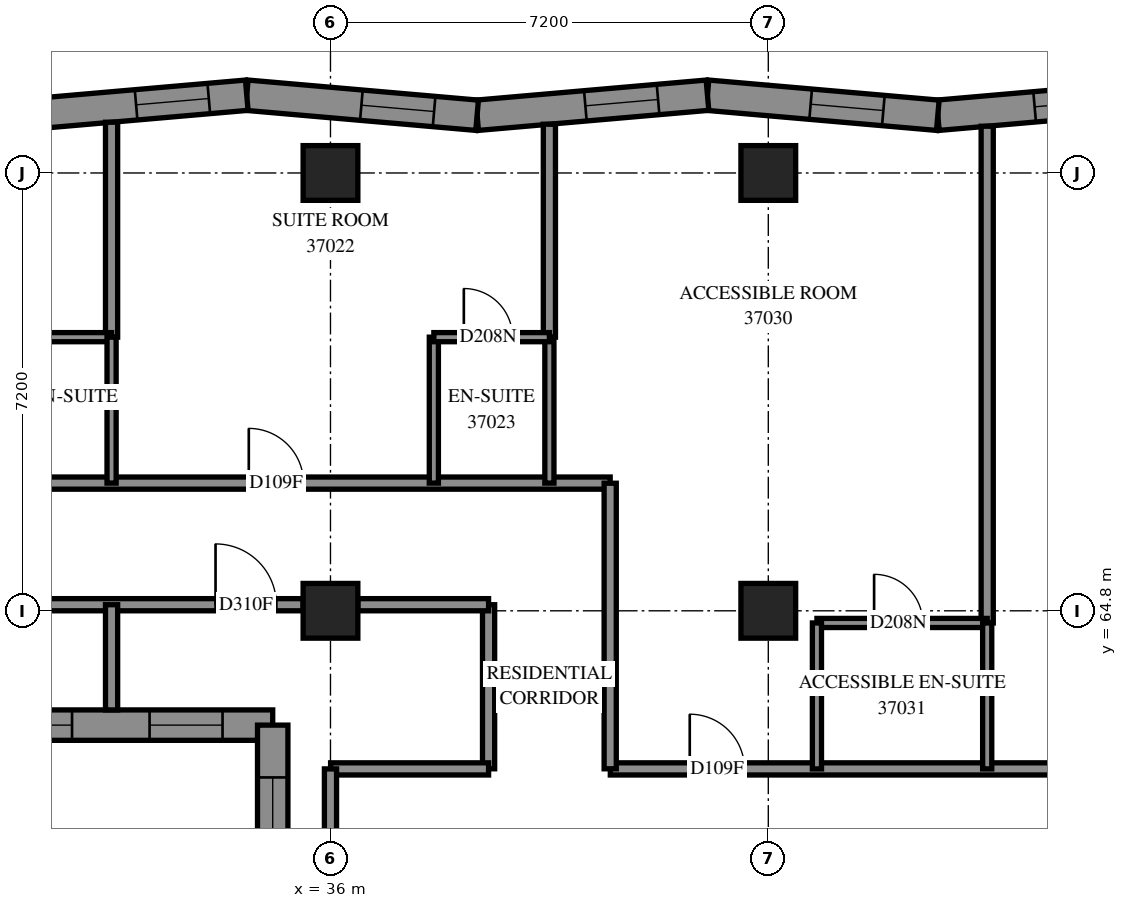
"""IFC4 building model, lengths in metres.
Left out: names, types, materials, properties, quantities, classifications, styles, units other than length and angle.
Written with IfcOpenShell. Run it as: python <this file> out.ifc"""

import sys

from ifc_helpers import new_model, si_unit, direction, frame, frame_2d, origin, origin_2d, place, context, subcontext, project, spatial, polyline, rectangle, outline, extrude, element, fill, save


model = new_model("IFC4")
c1 = context("Model", 3, precision=1e-05, world=origin(), true_north=direction((0.0, 1.0)))
c2 = subcontext(c1, "Body", "Model", "MODEL_VIEW")
j1 = project(units=[si_unit("LENGTHUNIT", "METRE"), si_unit("PLANEANGLEUNIT", "RADIAN")], contexts=[c1])
p1 = place(None, origin())
s1 = spatial("IfcSite", under=j1, at=p1, CompositionType="ELEMENT")
p2 = place(p1, origin())
s2 = spatial("IfcBuilding", under=s1, at=p2, CompositionType="ELEMENT")
p3 = place(p2, frame((0.0, 0.0, 138.8)))
s3 = spatial("IfcBuildingStorey", under=s2, at=p3, CompositionType="ELEMENT", Elevation=138.8)
for number, where, z_axis, x_axis in (
    (1, (36.0, 64.8, 0.0), (0.0, 0.0, 1.0), (1.0, 0.0, 0.0)),
    (2, (36.0, 72.0, 0.0), (0.0, 0.0, 1.0), (1.0, 0.0, 0.0)),
    (3, (43.2, 64.8, 0.0), (0.0, 0.0, 1.0), (1.0, 0.0, 0.0)),
    (4, (43.2, 72.0, 0.0), (0.0, 0.0, 1.0), (1.0, 0.0, 0.0)),
):
    element("IfcColumn", number, at=place(p3, frame(where, z_axis=z_axis, x_axis=x_axis)), inside=s3, PredefinedType="COLUMN", context=c2, shape_type="SweptSolid", body=[
        extrude(rectangle(XDim=0.9, YDim=0.9, at=origin_2d()), origin(), (0.0, 0.0, 1.0), 3.1),
    ])
p4 = place(p3, frame((49.776, 73.279, 0.0), z_axis=(0.0, 0.0, 1.0), x_axis=(-0.9962273538, -0.0867816769, 0.0)))
e5 = element("IfcWall", 5, at=p4, inside=s3, PredefinedType="SOLIDWALL", context=c2, shape_type="SweptSolid", body=[
    extrude(outline(polyline([(-0.022, -0.25), (3.781, -0.25), (3.824, 0.25), (0.022, 0.25), (-0.022, -0.25)])), origin(), (0.0, 0.0, 1.0), 3.1),
])
p5 = place(p4, frame((1.005, 0.0, 0.45)))
e6 = element("IfcOpeningElement", 6, at=p5, cuts=e5, PredefinedType="OPENING", context=c2, shape_type="SweptSolid", body=[
    extrude(rectangle(XDim=1.2, YDim=2.5, at=frame_2d((0.6, 1.25))), frame((0.0, 0.26, 0.0), z_axis=(0.0, -1.0, 0.0), x_axis=(1.0, 0.0, 0.0)), (0.0, 0.0, 1.0), 0.52),
])
p6 = place(p3, frame((45.988, 72.949, 0.0), z_axis=(0.0, 0.0, 1.0), x_axis=(-0.9962273538, 0.0867816769, 0.0)))
e7 = element("IfcWall", 7, at=p6, inside=s3, PredefinedType="SOLIDWALL", context=c2, shape_type="SweptSolid", body=[
    extrude(outline(polyline([(0.022, -0.25), (3.824, -0.25), (3.781, 0.25), (-0.022, 0.25), (0.022, -0.25)])), origin(), (0.0, 0.0, 1.0), 3.1),
])
p7 = place(p6, frame((0.899, 0.0, 0.45)))
e8 = element("IfcOpeningElement", 8, at=p7, cuts=e7, PredefinedType="OPENING", context=c2, shape_type="SweptSolid", body=[
    extrude(rectangle(XDim=1.2, YDim=2.5, at=frame_2d((0.6, 1.25))), frame((0.0, 0.26, 0.0), z_axis=(0.0, -1.0, 0.0), x_axis=(1.0, 0.0, 0.0)), (0.0, 0.0, 1.0), 0.52),
])
p8 = place(p3, frame((42.2, 73.279, 0.0), z_axis=(0.0, 0.0, 1.0), x_axis=(-0.9962273538, -0.0867816769, 0.0)))
e9 = element("IfcWall", 9, at=p8, inside=s3, PredefinedType="SOLIDWALL", context=c2, shape_type="SweptSolid", body=[
    extrude(outline(polyline([(-0.022, -0.25), (3.781, -0.25), (3.824, 0.25), (0.022, 0.25), (-0.022, -0.25)])), origin(), (0.0, 0.0, 1.0), 3.1),
])
p9 = place(p8, frame((0.816, 0.0, 0.45)))
e10 = element("IfcOpeningElement", 10, at=p9, cuts=e9, PredefinedType="OPENING", context=c2, shape_type="SweptSolid", body=[
    extrude(rectangle(XDim=1.2, YDim=2.5, at=frame_2d((0.6, 1.25))), frame((0.0, 0.26, 0.0), z_axis=(0.0, -1.0, 0.0), x_axis=(1.0, 0.0, 0.0)), (0.0, 0.0, 1.0), 0.52),
])
p10 = place(p3, frame((38.411, 72.949, 0.0), z_axis=(0.0, 0.0, 1.0), x_axis=(-0.9962271558, 0.0867839505, 0.0)))
e11 = element("IfcWall", 11, at=p10, inside=s3, PredefinedType="SOLIDWALL", context=c2, shape_type="SweptSolid", body=[
    extrude(outline(polyline([(0.022, -0.25), (3.824, -0.25), (3.781, 0.25), (-0.022, 0.25), (0.022, -0.25)])), origin(), (0.0, 0.0, 1.0), 3.1),
])
p11 = place(p10, frame((0.71, 0.0, 0.45)))
e12 = element("IfcOpeningElement", 12, at=p11, cuts=e11, PredefinedType="OPENING", context=c2, shape_type="SweptSolid", body=[
    extrude(rectangle(XDim=1.2, YDim=2.5, at=frame_2d((0.6, 1.25))), frame((0.0, 0.26, 0.0), z_axis=(0.0, -1.0, 0.0), x_axis=(1.0, 0.0, 0.0)), (0.0, 0.0, 1.0), 0.52),
])
p12 = place(p3, frame((34.623, 73.279, 0.0), z_axis=(0.0, 0.0, 1.0), x_axis=(-0.9962273538, -0.0867816769, 0.0)))
e13 = element("IfcWall", 13, at=p12, inside=s3, PredefinedType="SOLIDWALL", context=c2, shape_type="SweptSolid", body=[
    extrude(outline(polyline([(-0.022, -0.25), (3.781, -0.25), (3.824, 0.25), (0.022, 0.25), (-0.022, -0.25)])), origin(), (0.0, 0.0, 1.0), 3.1),
])
p13 = place(p12, frame((0.627, 0.0, 0.45)))
e14 = element("IfcOpeningElement", 14, at=p13, cuts=e13, PredefinedType="OPENING", context=c2, shape_type="SweptSolid", body=[
    extrude(rectangle(XDim=1.2, YDim=2.5, at=frame_2d((0.6, 1.25))), frame((0.0, 0.26, 0.0), z_axis=(0.0, -1.0, 0.0), x_axis=(1.0, 0.0, 0.0)), (0.0, 0.0, 1.0), 0.52),
])
p14 = place(p3, frame((19.72, 62.92, 0.0), z_axis=(0.0, 0.0, 1.0), x_axis=(1.0, 0.0, 0.0)))
e15 = element("IfcWall", 15, at=p14, inside=s3, PredefinedType="SOLIDWALL", context=c2, shape_type="SweptSolid", body=[
    extrude(outline(polyline([(-0.25, -0.25), (15.08, -0.25), (15.58, 0.25), (0.25, 0.25), (-0.25, -0.25)])), origin(), (0.0, 0.0, 1.0), 3.1),
])
p15 = place(p14, frame((2.28, 0.0, 0.45)))
e16 = element("IfcOpeningElement", 16, at=p15, cuts=e15, PredefinedType="OPENING", context=c2, shape_type="SweptSolid", body=[
    extrude(rectangle(XDim=2.8, YDim=2.5, at=frame_2d((1.4, 1.25))), frame((0.0, 0.26, 0.0), z_axis=(0.0, -1.0, 0.0), x_axis=(1.0, 0.0, 0.0)), (0.0, 0.0, 1.0), 0.52),
])
p16 = place(p14, frame((5.88, 0.0, 0.45)))
e17 = element("IfcOpeningElement", 17, at=p16, cuts=e15, PredefinedType="OPENING", context=c2, shape_type="SweptSolid", body=[
    extrude(rectangle(XDim=2.8, YDim=2.5, at=frame_2d((1.4, 1.25))), frame((0.0, 0.26, 0.0), z_axis=(0.0, -1.0, 0.0), x_axis=(1.0, 0.0, 0.0)), (0.0, 0.0, 1.0), 0.52),
])
p17 = place(p14, frame((9.23, 0.0, 0.45)))
e18 = element("IfcOpeningElement", 18, at=p17, cuts=e15, PredefinedType="OPENING", context=c2, shape_type="SweptSolid", body=[
    extrude(rectangle(XDim=2.8, YDim=2.5, at=frame_2d((1.4, 1.25))), frame((0.0, 0.26, 0.0), z_axis=(0.0, -1.0, 0.0), x_axis=(1.0, 0.0, 0.0)), (0.0, 0.0, 1.0), 0.52),
])
p18 = place(p14, frame((0.565, 0.0, 0.45)))
e19 = element("IfcOpeningElement", 19, at=p18, cuts=e15, PredefinedType="OPENING", context=c2, shape_type="SweptSolid", body=[
    extrude(rectangle(XDim=1.2, YDim=2.5, at=frame_2d((0.6, 1.25))), frame((0.0, 0.26, 0.0), z_axis=(0.0, -1.0, 0.0), x_axis=(1.0, 0.0, 0.0)), (0.0, 0.0, 1.0), 0.52),
])
p19 = place(p14, frame((13.305, 0.0, 0.45)))
e20 = element("IfcOpeningElement", 20, at=p19, cuts=e15, PredefinedType="OPENING", context=c2, shape_type="SweptSolid", body=[
    extrude(rectangle(XDim=1.2, YDim=2.5, at=frame_2d((0.6, 1.25))), frame((0.0, 0.26, 0.0), z_axis=(0.0, -1.0, 0.0), x_axis=(1.0, 0.0, 0.0)), (0.0, 0.0, 1.0), 0.52),
])
p20 = place(p3, frame((35.05, 62.92, 0.0), z_axis=(0.0, 0.0, 1.0), x_axis=(0.0, -1.0, 0.0)))
e21 = element("IfcWall", 21, at=p20, inside=s3, PredefinedType="SOLIDWALL", context=c2, shape_type="SweptSolid", body=[
    extrude(outline(polyline([(0.25, -0.25), (6.52, -0.25), (6.02, 0.25), (-0.25, 0.25), (0.25, -0.25)])), origin(), (0.0, 0.0, 1.0), 3.1),
])
p21 = place(p20, frame((0.86, 0.0, 0.45)))
e22 = element("IfcOpeningElement", 22, at=p21, cuts=e21, PredefinedType="OPENING", context=c2, shape_type="SweptSolid", body=[
    extrude(rectangle(XDim=1.2, YDim=2.5, at=frame_2d((0.6, 1.25))), frame((0.0, 0.26, 0.0), z_axis=(0.0, -1.0, 0.0), x_axis=(1.0, 0.0, 0.0)), (0.0, 0.0, 1.0), 0.52),
])
p22 = place(p20, frame((2.97, 0.0, 0.7)))
e23 = element("IfcOpeningElement", 23, at=p22, cuts=e21, PredefinedType="OPENING", context=c2, shape_type="SweptSolid", body=[
    extrude(rectangle(XDim=1.8, YDim=2.2, at=frame_2d((0.9, 1.1))), frame((0.0, 0.26, 0.0), z_axis=(0.0, -1.0, 0.0), x_axis=(1.0, 0.0, 0.0)), (0.0, 0.0, 1.0), 0.52),
])
p23 = place(p3, frame((21.6, 66.9, 0.0), z_axis=(0.0, 0.0, 1.0), x_axis=(1.0, 0.0, 0.0)))
e24 = element("IfcWall", 24, at=p23, inside=s3, PredefinedType="PARTITIONING", context=c2, shape_type="SweptSolid", body=[
    extrude(rectangle(XDim=19.0, YDim=0.2, at=frame_2d((9.5, 0.0))), origin(), (0.0, 0.0, 1.0), 3.1),
])
p24 = place(p23, frame((2.3, 0.0, 0.0)))
e25 = element("IfcOpeningElement", 25, at=p24, cuts=e24, PredefinedType="OPENING", context=c2, shape_type="SweptSolid", body=[
    extrude(rectangle(XDim=0.9, YDim=2.1, at=frame_2d((0.45, 1.05))), frame((0.0, 0.11, 0.0), z_axis=(0.0, -1.0, 0.0), x_axis=(1.0, 0.0, 0.0)), (0.0, 0.0, 1.0), 0.22),
])
p25 = place(p23, frame((5.957, 0.0, 0.0)))
e26 = element("IfcOpeningElement", 26, at=p25, cuts=e24, PredefinedType="OPENING", context=c2, shape_type="SweptSolid", body=[
    extrude(rectangle(XDim=0.9, YDim=2.1, at=frame_2d((0.45, 1.05))), frame((0.0, 0.11, 0.0), z_axis=(0.0, -1.0, 0.0), x_axis=(1.0, 0.0, 0.0)), (0.0, 0.0, 1.0), 0.22),
])
p26 = place(p23, frame((13.057, 0.0, 0.0)))
e27 = element("IfcOpeningElement", 27, at=p26, cuts=e24, PredefinedType="OPENING", context=c2, shape_type="SweptSolid", body=[
    extrude(rectangle(XDim=0.9, YDim=2.1, at=frame_2d((0.45, 1.05))), frame((0.0, 0.11, 0.0), z_axis=(0.0, -1.0, 0.0), x_axis=(1.0, 0.0, 0.0)), (0.0, 0.0, 1.0), 0.22),
])
p27 = place(p3, frame((40.602, 62.2, 0.0), z_axis=(0.0, 0.0, 1.0), x_axis=(1.0, 0.0, 0.0)))
e28 = element("IfcWall", 28, at=p27, inside=s3, PredefinedType="PARTITIONING", context=c2, shape_type="SweptSolid", body=[
    extrude(rectangle(XDim=14.298, YDim=0.2, at=frame_2d((7.149, 0.0))), origin(), (0.0, 0.0, 1.0), 3.1),
])
p28 = place(p27, frame((1.306, 0.0, 0.0)))
e29 = element("IfcOpeningElement", 29, at=p28, cuts=e28, PredefinedType="OPENING", context=c2, shape_type="SweptSolid", body=[
    extrude(rectangle(XDim=0.9, YDim=2.1, at=frame_2d((0.45, 1.05))), frame((0.0, 0.11, 0.0), z_axis=(0.0, -1.0, 0.0), x_axis=(1.0, 0.0, 0.0)), (0.0, 0.0, 1.0), 0.22),
])
p29 = place(p27, frame((8.455, 0.0, 0.0)))
e30 = element("IfcOpeningElement", 30, at=p29, cuts=e28, PredefinedType="OPENING", context=c2, shape_type="SweptSolid", body=[
    extrude(rectangle(XDim=0.9, YDim=2.1, at=frame_2d((0.45, 1.05))), frame((0.0, 0.11, 0.0), z_axis=(0.0, -1.0, 0.0), x_axis=(1.0, 0.0, 0.0)), (0.0, 0.0, 1.0), 0.22),
])
p30 = place(p3, frame((46.8, 64.6, 0.0), z_axis=(0.0, 0.0, 1.0), x_axis=(0.0, 1.0, 0.0)))
e31 = element("IfcWall", 31, at=p30, inside=s3, PredefinedType="PARTITIONING", context=c2, shape_type="SweptSolid", body=[
    extrude(rectangle(XDim=8.169, YDim=0.2, at=frame_2d((4.085, 0.0))), origin(), (0.0, 0.0, 1.0), 3.1),
])
p31 = place(p3, frame((29.25, 64.9, 0.0), z_axis=(0.0, 0.0, 1.0), x_axis=(1.0, 0.0, 0.0)))
e32 = element("IfcWall", 32, at=p31, inside=s3, PredefinedType="PARTITIONING", context=c2, shape_type="SweptSolid", body=[
    extrude(rectangle(XDim=6.3, YDim=0.2, at=frame_2d((3.15, 0.0))), origin(), (0.0, 0.0, 1.0), 2.6),
])
p32 = place(p31, frame((4.86, 0.0, 0.0)))
e33 = element("IfcOpeningElement", 33, at=p32, cuts=e32, PredefinedType="OPENING", context=c2, shape_type="SweptSolid", body=[
    extrude(rectangle(XDim=1.0, YDim=2.1, at=frame_2d((0.5, 1.05))), frame((0.0, 0.11, 0.0), z_axis=(0.0, -1.0, 0.0), x_axis=(1.0, 0.0, 0.0)), (0.0, 0.0, 1.0), 0.22),
])
p33 = place(p3, frame((40.6, 62.202, 0.0), z_axis=(0.0, 0.0, 1.0), x_axis=(0.0, 1.0, 0.0)))
e34 = element("IfcWall", 34, at=p33, inside=s3, PredefinedType="PARTITIONING", context=c2, shape_type="SweptSolid", body=[
    extrude(rectangle(XDim=4.696, YDim=0.2, at=frame_2d((2.348, 0.0))), origin(), (0.0, 0.0, 1.0), 3.1),
])
p34 = place(p3, frame((32.4, 69.3, 0.0), z_axis=(0.0, 0.0, 1.0), x_axis=(0.0, 1.0, 0.0)))
e35 = element("IfcWall", 35, at=p34, inside=s3, PredefinedType="PARTITIONING", context=c2, shape_type="SweptSolid", body=[
    extrude(rectangle(XDim=3.534, YDim=0.2, at=frame_2d((1.767, 0.0))), origin(), (0.0, 0.0, 1.0), 3.1),
])
p35 = place(p3, frame((39.6, 69.3, 0.0), z_axis=(0.0, 0.0, 1.0), x_axis=(0.0, 1.0, 0.0)))
e36 = element("IfcWall", 36, at=p35, inside=s3, PredefinedType="PARTITIONING", context=c2, shape_type="SweptSolid", body=[
    extrude(rectangle(XDim=3.502, YDim=0.2, at=frame_2d((1.751, 0.0))), origin(), (0.0, 0.0, 1.0), 3.1),
])
p36 = place(p3, frame((29.2, 69.3, 0.0), z_axis=(0.0, 0.0, 1.0), x_axis=(1.0, 0.0, 0.0)))
e37 = element("IfcWall", 37, at=p36, inside=s3, PredefinedType="PARTITIONING", context=c2, shape_type="SweptSolid", body=[
    extrude(rectangle(XDim=3.2, YDim=0.15, at=frame_2d((1.6, 0.0))), origin(), (0.0, 0.0, 1.0), 3.1),
])
p37 = place(p36, frame((1.204, 0.0, 0.0)))
e38 = element("IfcOpeningElement", 38, at=p37, cuts=e37, PredefinedType="OPENING", context=c2, shape_type="SweptSolid", body=[
    extrude(rectangle(XDim=0.8, YDim=2.1, at=frame_2d((0.4, 1.05))), frame((0.0, 0.085, 0.0), z_axis=(0.0, -1.0, 0.0), x_axis=(1.0, 0.0, 0.0)), (0.0, 0.0, 1.0), 0.17),
])
p38 = place(p3, frame((44.0, 64.6, 0.0), z_axis=(0.0, 0.0, 1.0), x_axis=(1.0, 0.0, 0.0)))
e39 = element("IfcWall", 39, at=p38, inside=s3, PredefinedType="PARTITIONING", context=c2, shape_type="SweptSolid", body=[
    extrude(rectangle(XDim=2.8, YDim=0.15, at=frame_2d((1.4, 0.0))), origin(), (0.0, 0.0, 1.0), 3.1),
])
p39 = place(p38, frame((0.94, 0.0, 0.0)))
e40 = element("IfcOpeningElement", 40, at=p39, cuts=e39, PredefinedType="OPENING", context=c2, shape_type="SweptSolid", body=[
    extrude(rectangle(XDim=0.8, YDim=2.1, at=frame_2d((0.4, 1.05))), frame((0.0, 0.085, 0.0), z_axis=(0.0, -1.0, 0.0), x_axis=(1.0, 0.0, 0.0)), (0.0, 0.0, 1.0), 0.17),
])
p40 = place(p3, frame((38.6, 62.202, 0.0), z_axis=(0.0, 0.0, 1.0), x_axis=(0.0, 1.0, 0.0)))
e41 = element("IfcWall", 41, at=p40, inside=s3, PredefinedType="PARTITIONING", context=c2, shape_type="SweptSolid", body=[
    extrude(rectangle(XDim=2.698, YDim=0.2, at=frame_2d((1.349, 0.0))), origin(), (0.0, 0.0, 1.0), 3.1),
])
p41 = place(p3, frame((36.002, 62.2, 0.0), z_axis=(0.0, 0.0, 1.0), x_axis=(1.0, 0.0, 0.0)))
e42 = element("IfcWall", 42, at=p41, inside=s3, PredefinedType="PARTITIONING", context=c2, shape_type="SweptSolid", body=[
    extrude(rectangle(XDim=2.598, YDim=0.2, at=frame_2d((1.299, 0.0))), origin(), (0.0, 0.0, 1.0), 3.1),
])
for number, where, z_axis, x_axis in (
    (43, (32.4, 66.9, 0.0), (0.0, 0.0, 1.0), (0.0, 1.0, 0.0)),
    (44, (37.7, 66.9, 0.0), (0.0, 0.0, 1.0), (0.0, 1.0, 0.0)),
    (45, (39.6, 66.9, 0.0), (0.0, 0.0, 1.0), (0.0, 1.0, 0.0)),
    (46, (44.0, 62.2, 0.0), (0.0, 0.0, 1.0), (0.0, 1.0, 0.0)),
    (47, (46.8, 62.2, 0.0), (0.0, 0.0, 1.0), (0.0, 1.0, 0.0)),
):
    element("IfcWall", number, at=place(p3, frame(where, z_axis=z_axis, x_axis=x_axis)), inside=s3, PredefinedType="PARTITIONING", context=c2, shape_type="SweptSolid", body=[
        extrude(rectangle(XDim=2.4, YDim=0.15, at=frame_2d((1.2, 0.0))), origin(), (0.0, 0.0, 1.0), 3.1),
    ])
p42 = place(p3, frame((36.45, 64.9, 0.0), z_axis=(0.0, 0.0, 1.0), x_axis=(1.0, 0.0, 0.0)))
e48 = element("IfcWall", 48, at=p42, inside=s3, PredefinedType="PARTITIONING", context=c2, shape_type="SweptSolid", body=[
    extrude(rectangle(XDim=2.15, YDim=0.2, at=frame_2d((1.075, 0.0))), origin(), (0.0, 0.0, 1.0), 3.1),
])
p43 = place(p3, frame((36.0, 60.2, 0.0), z_axis=(0.0, 0.0, 1.0), x_axis=(0.0, 1.0, 0.0)))
e49 = element("IfcWall", 49, at=p43, inside=s3, PredefinedType="PARTITIONING", context=c2, shape_type="SweptSolid", body=[
    extrude(rectangle(XDim=2.0, YDim=0.2, at=frame_2d((1.0, 0.0))), origin(), (0.0, 0.0, 1.0), 2.6),
])
p44 = place(p3, frame((37.7, 69.3, 0.0), z_axis=(0.0, 0.0, 1.0), x_axis=(1.0, 0.0, 0.0)))
e50 = element("IfcWall", 50, at=p44, inside=s3, PredefinedType="PARTITIONING", context=c2, shape_type="SweptSolid", body=[
    extrude(rectangle(XDim=1.9, YDim=0.15, at=frame_2d((0.95, 0.0))), origin(), (0.0, 0.0, 1.0), 3.1),
])
p45 = place(p44, frame((0.493, 0.0, 0.0)))
e51 = element("IfcOpeningElement", 51, at=p45, cuts=e50, PredefinedType="OPENING", context=c2, shape_type="SweptSolid", body=[
    extrude(rectangle(XDim=0.8, YDim=2.1, at=frame_2d((0.4, 1.05))), frame((0.0, 0.085, 0.0), z_axis=(0.0, -1.0, 0.0), x_axis=(1.0, 0.0, 0.0)), (0.0, 0.0, 1.0), 0.17),
])
p46 = place(p3, frame((32.4, 63.17, 0.0), z_axis=(0.0, 0.0, 1.0), x_axis=(0.0, 1.0, 0.0)))
e52 = element("IfcWall", 52, at=p46, inside=s3, PredefinedType="PARTITIONING", context=c2, shape_type="SweptSolid", body=[
    extrude(rectangle(XDim=1.73, YDim=0.2, at=frame_2d((0.865, 0.0))), origin(), (0.0, 0.0, 1.0), 3.1),
])
p47 = place(p5, origin())
e53 = element("IfcWindow", 53, at=p47, inside=s3, PartitioningType="SINGLE_PANEL", PredefinedType="WINDOW", context=c2, shape_type="SweptSolid", body=[
    extrude(rectangle(XDim=1.2, YDim=2.5, at=frame_2d((0.6, 1.25))), frame((0.0, 0.18, 0.0), z_axis=(0.0, -1.0, 0.0), x_axis=(1.0, 0.0, 0.0)), (0.0, 0.0, 1.0), 0.06),
])
fill(e6, e53)
p48 = place(p7, origin())
e54 = element("IfcWindow", 54, at=p48, inside=s3, PartitioningType="SINGLE_PANEL", PredefinedType="WINDOW", context=c2, shape_type="SweptSolid", body=[
    extrude(rectangle(XDim=1.2, YDim=2.5, at=frame_2d((0.6, 1.25))), frame((0.0, 0.18, 0.0), z_axis=(0.0, -1.0, 0.0), x_axis=(1.0, 0.0, 0.0)), (0.0, 0.0, 1.0), 0.06),
])
fill(e8, e54)
p49 = place(p9, origin())
e55 = element("IfcWindow", 55, at=p49, inside=s3, PartitioningType="SINGLE_PANEL", PredefinedType="WINDOW", context=c2, shape_type="SweptSolid", body=[
    extrude(rectangle(XDim=1.2, YDim=2.5, at=frame_2d((0.6, 1.25))), frame((0.0, 0.18, 0.0), z_axis=(0.0, -1.0, 0.0), x_axis=(1.0, 0.0, 0.0)), (0.0, 0.0, 1.0), 0.06),
])
fill(e10, e55)
p50 = place(p11, origin())
e56 = element("IfcWindow", 56, at=p50, inside=s3, PartitioningType="SINGLE_PANEL", PredefinedType="WINDOW", context=c2, shape_type="SweptSolid", body=[
    extrude(rectangle(XDim=1.2, YDim=2.5, at=frame_2d((0.6, 1.25))), frame((0.0, 0.18, 0.0), z_axis=(0.0, -1.0, 0.0), x_axis=(1.0, 0.0, 0.0)), (0.0, 0.0, 1.0), 0.06),
])
fill(e12, e56)
p51 = place(p13, origin())
e57 = element("IfcWindow", 57, at=p51, inside=s3, PartitioningType="SINGLE_PANEL", PredefinedType="WINDOW", context=c2, shape_type="SweptSolid", body=[
    extrude(rectangle(XDim=1.2, YDim=2.5, at=frame_2d((0.6, 1.25))), frame((0.0, 0.18, 0.0), z_axis=(0.0, -1.0, 0.0), x_axis=(1.0, 0.0, 0.0)), (0.0, 0.0, 1.0), 0.06),
])
fill(e14, e57)
p52 = place(p17, origin())
e58 = element("IfcWindow", 58, at=p52, inside=s3, PartitioningType="SINGLE_PANEL", PredefinedType="WINDOW", context=c2, shape_type="SweptSolid", body=[
    extrude(rectangle(XDim=2.8, YDim=2.5, at=frame_2d((1.4, 1.25))), frame((0.0, 0.18, 0.0), z_axis=(0.0, -1.0, 0.0), x_axis=(1.0, 0.0, 0.0)), (0.0, 0.0, 1.0), 0.06),
])
fill(e18, e58)
p53 = place(p19, origin())
e59 = element("IfcWindow", 59, at=p53, inside=s3, PartitioningType="SINGLE_PANEL", PredefinedType="WINDOW", context=c2, shape_type="SweptSolid", body=[
    extrude(rectangle(XDim=1.2, YDim=2.5, at=frame_2d((0.6, 1.25))), frame((0.0, 0.18, 0.0), z_axis=(0.0, -1.0, 0.0), x_axis=(1.0, 0.0, 0.0)), (0.0, 0.0, 1.0), 0.06),
])
fill(e20, e59)
p54 = place(p21, origin())
e60 = element("IfcWindow", 60, at=p54, inside=s3, PartitioningType="SINGLE_PANEL", PredefinedType="WINDOW", context=c2, shape_type="SweptSolid", body=[
    extrude(rectangle(XDim=1.2, YDim=2.5, at=frame_2d((0.6, 1.25))), frame((0.0, 0.18, 0.0), z_axis=(0.0, -1.0, 0.0), x_axis=(1.0, 0.0, 0.0)), (0.0, 0.0, 1.0), 0.06),
])
fill(e22, e60)
p55 = place(p26, origin())
e61 = element("IfcDoor", 61, at=p55, inside=s3, OperationType="SINGLE_SWING_LEFT", PredefinedType="DOOR", context=c2, shape_type="SweptSolid", body=[
    extrude(rectangle(XDim=0.9, YDim=2.1, at=frame_2d((0.45, 1.05))), frame((0.0, 0.025, 0.0), z_axis=(0.0, -1.0, 0.0), x_axis=(1.0, 0.0, 0.0)), (0.0, 0.0, 1.0), 0.05),
])
fill(e27, e61)
p56 = place(p45, origin())
e62 = element("IfcDoor", 62, at=p56, inside=s3, OperationType="SINGLE_SWING_RIGHT", PredefinedType="DOOR", context=c2, shape_type="SweptSolid", body=[
    extrude(rectangle(XDim=0.8, YDim=2.1, at=frame_2d((0.4, 1.05))), frame((0.0, 0.025, 0.0), z_axis=(0.0, -1.0, 0.0), x_axis=(1.0, 0.0, 0.0)), (0.0, 0.0, 1.0), 0.05),
])
fill(e51, e62)
p57 = place(p32, origin())
e63 = element("IfcDoor", 63, at=p57, inside=s3, OperationType="SINGLE_SWING_RIGHT", PredefinedType="DOOR", context=c2, shape_type="SweptSolid", body=[
    extrude(rectangle(XDim=1.0, YDim=2.1, at=frame_2d((0.5, 1.05))), frame((0.0, 0.025, 0.0), z_axis=(0.0, -1.0, 0.0), x_axis=(1.0, 0.0, 0.0)), (0.0, 0.0, 1.0), 0.05),
])
fill(e33, e63)
p58 = place(p28, origin())
e64 = element("IfcDoor", 64, at=p58, inside=s3, OperationType="SINGLE_SWING_LEFT", PredefinedType="DOOR", context=c2, shape_type="SweptSolid", body=[
    extrude(rectangle(XDim=0.9, YDim=2.1, at=frame_2d((0.45, 1.05))), frame((0.0, 0.025, 0.0), z_axis=(0.0, -1.0, 0.0), x_axis=(1.0, 0.0, 0.0)), (0.0, 0.0, 1.0), 0.05),
])
fill(e29, e64)
p59 = place(p39, origin())
e65 = element("IfcDoor", 65, at=p59, inside=s3, OperationType="SINGLE_SWING_RIGHT", PredefinedType="DOOR", context=c2, shape_type="SweptSolid", body=[
    extrude(rectangle(XDim=0.8, YDim=2.1, at=frame_2d((0.4, 1.05))), frame((0.0, 0.025, 0.0), z_axis=(0.0, -1.0, 0.0), x_axis=(1.0, 0.0, 0.0)), (0.0, 0.0, 1.0), 0.05),
])
fill(e40, e65)
save(model, sys.argv[1])
